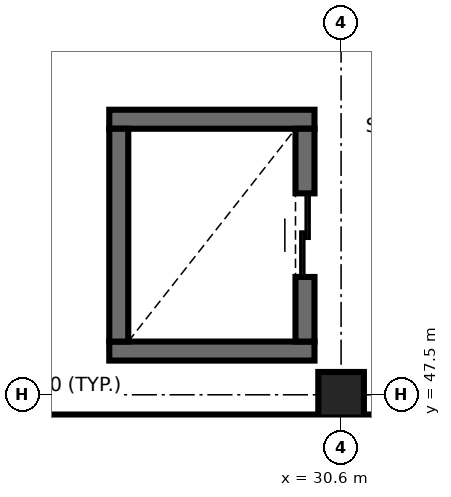
"""IFC4 building model, lengths in metres.
Left out: names, types, materials, properties, quantities, classifications, styles, units other than length and angle.
Written with IfcOpenShell. Run it as: python <this file> out.ifc"""

import sys

from ifc_helpers import new_model, si_unit, direction, frame, frame_2d, origin, origin_2d, place, context, subcontext, project, spatial, rectangle, extrude, element, fill, save


model = new_model("IFC4")
c1 = context("Model", 3, precision=1e-05, world=origin(), true_north=direction((0.0, 1.0)))
c2 = subcontext(c1, "Body", "Model", "MODEL_VIEW")
j1 = project(units=[si_unit("LENGTHUNIT", "METRE"), si_unit("PLANEANGLEUNIT", "RADIAN")], contexts=[c1])
p1 = place(None, origin())
s1 = spatial("IfcSite", under=j1, at=p1, CompositionType="ELEMENT")
p2 = place(p1, origin())
s2 = spatial("IfcBuilding", under=s1, at=p2, CompositionType="ELEMENT")
p3 = place(p2, frame((0.0, 0.0, 13.8)))
s3 = spatial("IfcBuildingStorey", under=s2, at=p3, CompositionType="ELEMENT", Elevation=13.8)
p4 = place(p3, frame((30.6, 47.5, 0.0), z_axis=(0.0, 0.0, 1.0), x_axis=(1.0, 0.0, 0.0)))
e1 = element("IfcColumn", 1, at=p4, inside=s3, PredefinedType="COLUMN", context=c2, shape_type="SweptSolid", body=[
    extrude(rectangle(XDim=0.6, YDim=0.6, at=origin_2d()), origin(), (0.0, 0.0, 1.0), 4.5),
])
for number, where, z_axis, x_axis in (
    (2, (27.55, 48.075, 0.0), (0.0, 0.0, 1.0), (1.0, 0.0, 0.0)),
    (3, (30.25, 51.125, 0.0), (0.0, 0.0, 1.0), (-1.0, 0.0, 0.0)),
):
    element("IfcWall", number, at=place(p3, frame(where, z_axis=z_axis, x_axis=x_axis)), inside=s3, PredefinedType="SHEAR", context=c2, shape_type="SweptSolid", body=[
        extrude(rectangle(XDim=2.7, YDim=0.25, at=frame_2d((1.35, 0.0))), origin(), (0.0, 0.0, 1.0), 4.5),
    ])
p5 = place(p3, frame((27.675, 51.0, 0.0), z_axis=(0.0, 0.0, 1.0), x_axis=(0.0, -1.0, 0.0)))
e4 = element("IfcWall", 4, at=p5, inside=s3, PredefinedType="SHEAR", context=c2, shape_type="SweptSolid", body=[
    extrude(rectangle(XDim=2.8, YDim=0.25, at=frame_2d((1.4, 0.0))), origin(), (0.0, 0.0, 1.0), 4.5),
])
p6 = place(p3, frame((30.125, 48.2, 0.0), z_axis=(0.0, 0.0, 1.0), x_axis=(0.0, 1.0, 0.0)))
e5 = element("IfcWall", 5, at=p6, inside=s3, PredefinedType="SHEAR", context=c2, shape_type="SweptSolid", body=[
    extrude(rectangle(XDim=2.8, YDim=0.25, at=frame_2d((1.4, 0.0))), origin(), (0.0, 0.0, 1.0), 4.5),
])
p7 = place(p6, frame((0.85, 0.0, 0.0)))
e6 = element("IfcOpeningElement", 6, at=p7, cuts=e5, PredefinedType="OPENING", context=c2, shape_type="SweptSolid", body=[
    extrude(rectangle(XDim=1.1, YDim=2.15, at=frame_2d((0.55, 1.075))), frame((0.0, 0.135, 0.0), z_axis=(0.0, -1.0, 0.0), x_axis=(1.0, 0.0, 0.0)), (0.0, 0.0, 1.0), 0.27),
])
p8 = place(p3, frame((5.922, 47.07, 0.0), z_axis=(0.0, 0.0, 1.0), x_axis=(1.0, 0.0, 0.0)))
e7 = element("IfcWall", 7, at=p8, inside=s3, PredefinedType="SOLIDWALL", context=c2, shape_type="SweptSolid", body=[
    extrude(rectangle(XDim=41.478, YDim=0.34, at=frame_2d((20.739, 0.0))), origin(), (0.0, 0.0, 1.0), 4.25),
])
p9 = place(p8, frame((3.568, 0.0, 0.9)))
e8 = element("IfcOpeningElement", 8, at=p9, cuts=e7, PredefinedType="OPENING", context=c2, shape_type="SweptSolid", body=[
    extrude(rectangle(XDim=2.2, YDim=1.65, at=frame_2d((1.1, 0.825))), frame((0.0, 0.18, 0.0), z_axis=(0.0, -1.0, 0.0), x_axis=(1.0, 0.0, 0.0)), (0.0, 0.0, 1.0), 0.36),
])
p10 = place(p8, frame((25.758, 0.0, 0.9)))
e9 = element("IfcOpeningElement", 9, at=p10, cuts=e7, PredefinedType="OPENING", context=c2, shape_type="SweptSolid", body=[
    extrude(rectangle(XDim=1.5, YDim=1.8, at=frame_2d((0.75, 0.9))), frame((0.0, 0.18, 0.0), z_axis=(0.0, -1.0, 0.0), x_axis=(1.0, 0.0, 0.0)), (0.0, 0.0, 1.0), 0.36),
])
p11 = place(p8, frame((29.258, 0.0, 0.9)))
e10 = element("IfcOpeningElement", 10, at=p11, cuts=e7, PredefinedType="OPENING", context=c2, shape_type="SweptSolid", body=[
    extrude(rectangle(XDim=2.1, YDim=1.8, at=frame_2d((1.05, 0.9))), frame((0.0, 0.18, 0.0), z_axis=(0.0, -1.0, 0.0), x_axis=(1.0, 0.0, 0.0)), (0.0, 0.0, 1.0), 0.36),
])
p12 = place(p8, frame((35.328, 0.0, 0.9)))
e11 = element("IfcOpeningElement", 11, at=p12, cuts=e7, PredefinedType="OPENING", context=c2, shape_type="SweptSolid", body=[
    extrude(rectangle(XDim=2.7, YDim=1.8, at=frame_2d((1.35, 0.9))), frame((0.0, 0.18, 0.0), z_axis=(0.0, -1.0, 0.0), x_axis=(1.0, 0.0, 0.0)), (0.0, 0.0, 1.0), 0.36),
])
p13 = place(p7, origin())
e12 = element("IfcDoor", 12, at=p13, inside=s3, OperationType="DOUBLE_DOOR_SLIDING", PredefinedType="DOOR", context=c2, shape_type="SweptSolid", body=[
    extrude(rectangle(XDim=1.1, YDim=2.15, at=frame_2d((0.55, 1.075))), frame((0.0, 0.025, 0.0), z_axis=(0.0, -1.0, 0.0), x_axis=(1.0, 0.0, 0.0)), (0.0, 0.0, 1.0), 0.05),
])
fill(e6, e12)
save(model, sys.argv[1])
